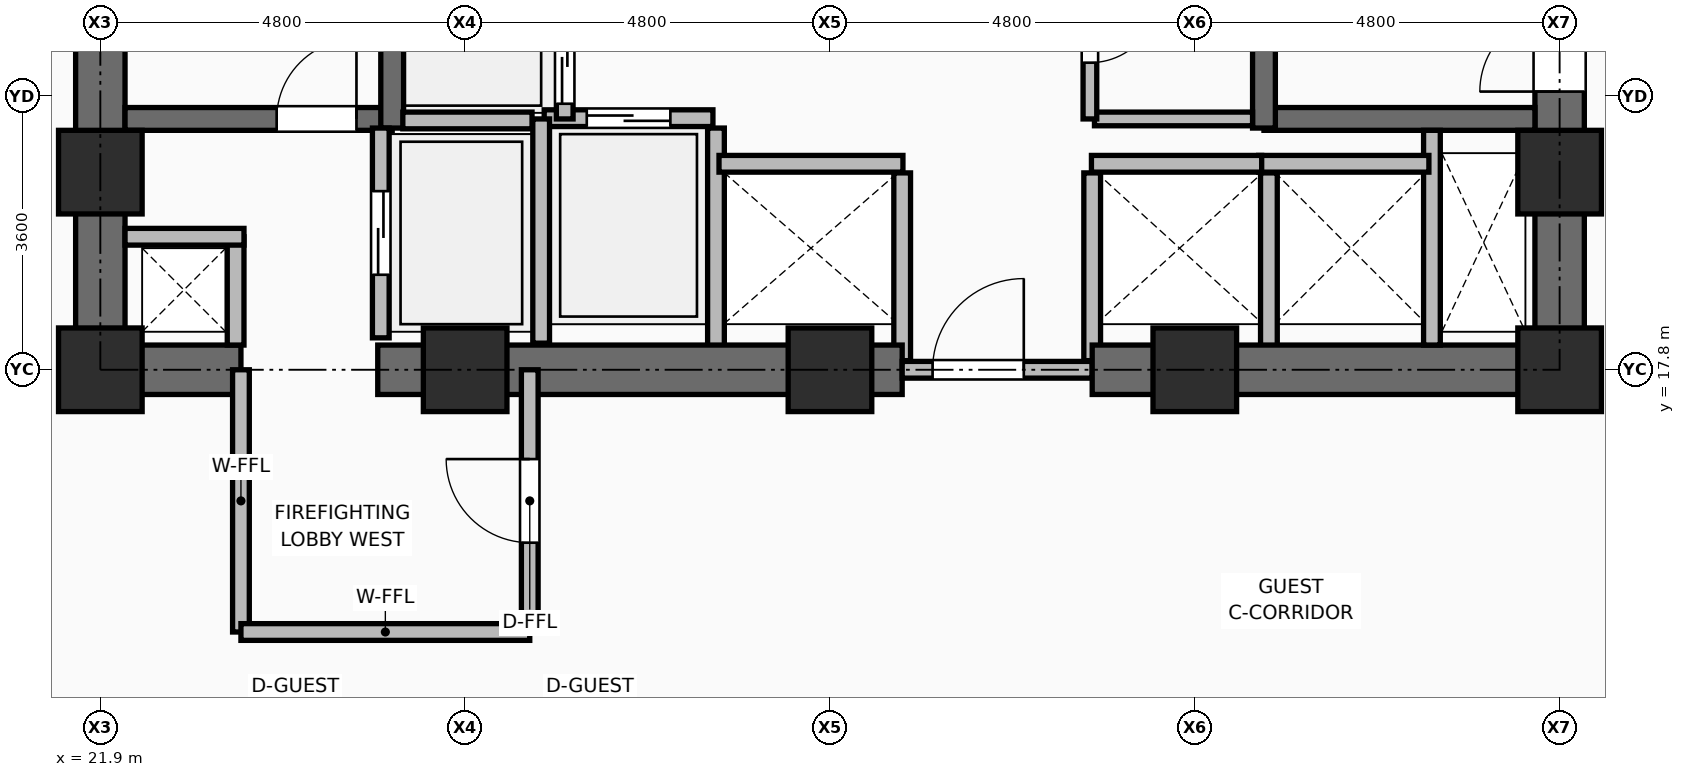
"""IFC4 building model, lengths in metres.
Left out: names, types, materials, properties, quantities, classifications, styles, units other than length and angle.
Written with IfcOpenShell. Run it as: python <this file> out.ifc"""

import sys

from ifc_helpers import new_model, si_unit, direction, frame, frame_2d, origin, origin_2d, place, context, subcontext, project, spatial, rectangle, extrude, element, fill, save


model = new_model("IFC4")
c1 = context("Model", 3, precision=1e-05, world=origin(), true_north=direction((0.0, 1.0)))
c2 = subcontext(c1, "Body", "Model", "MODEL_VIEW")
j1 = project(units=[si_unit("LENGTHUNIT", "METRE"), si_unit("PLANEANGLEUNIT", "RADIAN")], contexts=[c1])
p1 = place(None, origin())
s1 = spatial("IfcSite", under=j1, at=p1, CompositionType="ELEMENT")
p2 = place(p1, origin())
s2 = spatial("IfcBuilding", under=s1, at=p2, CompositionType="ELEMENT")
p3 = place(p2, frame((0.0, 0.0, 79.5)))
s3 = spatial("IfcBuildingStorey", under=s2, at=p3, CompositionType="ELEMENT", Elevation=79.5)
for number, where, z_axis, x_axis in (
    (1, (21.9, 17.8, 0.0), (0.0, 0.0, 1.0), (1.0, 0.0, 0.0)),
    (2, (26.7, 17.8, 0.0), (0.0, 0.0, 1.0), (1.0, 0.0, 0.0)),
    (3, (31.5, 17.8, 0.0), (0.0, 0.0, 1.0), (1.0, 0.0, 0.0)),
    (4, (36.3, 17.8, 0.0), (0.0, 0.0, 1.0), (1.0, 0.0, 0.0)),
    (5, (41.1, 17.8, 0.0), (0.0, 0.0, 1.0), (1.0, 0.0, 0.0)),
    (6, (21.9, 20.4, 0.0), (0.0, 0.0, 1.0), (1.0, 0.0, 0.0)),
    (7, (41.1, 20.4, 0.0), (0.0, 0.0, 1.0), (1.0, 0.0, 0.0)),
):
    element("IfcColumn", number, at=place(p3, frame(where, z_axis=z_axis, x_axis=x_axis)), inside=s3, PredefinedType="COLUMN", context=c2, shape_type="SweptSolid", body=[
        extrude(rectangle(XDim=1.1, YDim=1.1, at=origin_2d()), origin(), (0.0, 0.0, 1.0), 3.75),
    ])
p4 = place(p3, frame((30.0, 18.08, 0.0), z_axis=(0.0, 0.0, 1.0), x_axis=(0.0, 1.0, 0.0)))
e8 = element("IfcWall", 8, at=p4, inside=s3, PredefinedType="PARTITIONING", context=c2, shape_type="SweptSolid", body=[
    extrude(rectangle(XDim=2.9, YDim=0.22, at=frame_2d((1.45, 0.0))), origin(), (0.0, 0.0, 1.0), 3.545),
])
for number, where, z_axis, x_axis in (
    (9, (32.45, 17.92, 0.0), (0.0, 0.0, 1.0), (0.0, 1.0, 0.0)),
    (10, (34.95, 17.92, 0.0), (0.0, 0.0, 1.0), (0.0, 1.0, 0.0)),
):
    element("IfcWall", number, at=place(p3, frame(where, z_axis=z_axis, x_axis=x_axis)), inside=s3, PredefinedType="PARTITIONING", context=c2, shape_type="SweptSolid", body=[
        extrude(rectangle(XDim=2.47, YDim=0.22, at=frame_2d((1.235, 0.0))), origin(), (0.0, 0.0, 1.0), 2.928),
    ])
p5 = place(p3, frame((37.275, 18.08, 0.0), z_axis=(0.0, 0.0, 1.0), x_axis=(0.0, 1.0, 0.0)))
e11 = element("IfcWall", 11, at=p5, inside=s3, PredefinedType="PARTITIONING", context=c2, shape_type="SweptSolid", body=[
    extrude(rectangle(XDim=2.31, YDim=0.22, at=frame_2d((1.155, 0.0))), origin(), (0.0, 0.0, 1.0), 3.545),
])
p6 = place(p3, frame((21.575, 17.8, 0.0), z_axis=(0.0, 0.0, 1.0), x_axis=(1.0, 0.0, 0.0)))
e12 = element("IfcWall", 12, at=p6, inside=s3, PredefinedType="SHEAR", context=c2, shape_type="SweptSolid", body=[
    extrude(rectangle(XDim=2.175, YDim=0.65, at=frame_2d((1.087, 0.0))), origin(), (0.0, 0.0, 1.0), 3.57),
])
p7 = place(p3, frame((25.55, 17.8, 0.0), z_axis=(0.0, 0.0, 1.0), x_axis=(1.0, 0.0, 0.0)))
e13 = element("IfcWall", 13, at=p7, inside=s3, PredefinedType="SHEAR", context=c2, shape_type="SweptSolid", body=[
    extrude(rectangle(XDim=6.9, YDim=0.65, at=frame_2d((3.45, 0.0))), origin(), (0.0, 0.0, 1.0), 3.57),
])
p8 = place(p3, frame((32.45, 17.8, 0.0), z_axis=(0.0, 0.0, 1.0), x_axis=(1.0, 0.0, 0.0)))
e14 = element("IfcWall", 14, at=p8, inside=s3, PredefinedType="PARTITIONING", context=c2, shape_type="SweptSolid", body=[
    extrude(rectangle(XDim=2.5, YDim=0.22, at=frame_2d((1.25, 0.0))), origin(), (0.0, 0.0, 1.0), 2.928),
])
p9 = place(p8, frame((0.4, 0.0, 0.0)))
e15 = element("IfcOpeningElement", 15, at=p9, cuts=e14, PredefinedType="OPENING", context=c2, shape_type="SweptSolid", body=[
    extrude(rectangle(XDim=1.2, YDim=2.1, at=frame_2d((0.6, 1.05))), frame((0.0, 0.12, 0.0), z_axis=(0.0, -1.0, 0.0), x_axis=(1.0, 0.0, 0.0)), (0.0, 0.0, 1.0), 0.24),
])
p10 = place(p3, frame((34.95, 17.8, 0.0), z_axis=(0.0, 0.0, 1.0), x_axis=(1.0, 0.0, 0.0)))
e16 = element("IfcWall", 16, at=p10, inside=s3, PredefinedType="SHEAR", context=c2, shape_type="SweptSolid", body=[
    extrude(rectangle(XDim=6.475, YDim=0.65, at=frame_2d((3.238, 0.0))), origin(), (0.0, 0.0, 1.0), 3.57),
])
p11 = place(p3, frame((21.9, 18.125, 0.0), z_axis=(0.0, 0.0, 1.0), x_axis=(0.0, 1.0, 0.0)))
e17 = element("IfcWall", 17, at=p11, inside=s3, PredefinedType="SHEAR", context=c2, shape_type="SweptSolid", body=[
    extrude(rectangle(XDim=14.0, YDim=0.65, at=frame_2d((7.0, 0.0))), origin(), (0.0, 0.0, 1.0), 3.57),
])
p12 = place(p3, frame((41.1, 18.125, 0.0), z_axis=(0.0, 0.0, 1.0), x_axis=(0.0, 1.0, 0.0)))
e18 = element("IfcWall", 18, at=p12, inside=s3, PredefinedType="SHEAR", context=c2, shape_type="SweptSolid", body=[
    extrude(rectangle(XDim=14.0, YDim=0.65, at=frame_2d((7.0, 0.0))), origin(), (0.0, 0.0, 1.0), 3.57),
])
p13 = place(p12, frame((3.335, 0.0, 0.0)))
e19 = element("IfcOpeningElement", 19, at=p13, cuts=e18, PredefinedType="OPENING", context=c2, shape_type="SweptSolid", body=[
    extrude(rectangle(XDim=1.05, YDim=2.1, at=frame_2d((0.525, 1.05))), frame((0.0, 0.335, 0.0), z_axis=(0.0, -1.0, 0.0), x_axis=(1.0, 0.0, 0.0)), (0.0, 0.0, 1.0), 0.67),
])
p14 = place(p3, frame((22.225, 21.1, 0.0), z_axis=(0.0, 0.0, 1.0), x_axis=(1.0, 0.0, 0.0)))
e20 = element("IfcWall", 20, at=p14, inside=s3, PredefinedType="SHEAR", context=c2, shape_type="SweptSolid", body=[
    extrude(rectangle(XDim=3.515, YDim=0.3, at=frame_2d((1.757, 0.0))), origin(), (0.0, 0.0, 1.0), 3.57),
])
p15 = place(p14, frame((1.995, 0.0, 0.0)))
e21 = element("IfcOpeningElement", 21, at=p15, cuts=e20, PredefinedType="OPENING", context=c2, shape_type="SweptSolid", body=[
    extrude(rectangle(XDim=1.05, YDim=2.1, at=frame_2d((0.525, 1.05))), frame((0.0, 0.16, 0.0), z_axis=(0.0, -1.0, 0.0), x_axis=(1.0, 0.0, 0.0)), (0.0, 0.0, 1.0), 0.32),
])
p16 = place(p3, frame((25.74, 20.98, 0.0), z_axis=(0.0, 0.0, 1.0), x_axis=(0.0, 1.0, 0.0)))
e22 = element("IfcWall", 22, at=p16, inside=s3, PredefinedType="SHEAR", context=c2, shape_type="SweptSolid", body=[
    extrude(rectangle(XDim=7.99, YDim=0.3, at=frame_2d((3.995, 0.0))), origin(), (0.0, 0.0, 1.0), 3.57),
])
p17 = place(p3, frame((37.21, 21.1, 0.0), z_axis=(0.0, 0.0, 1.0), x_axis=(1.0, 0.0, 0.0)))
e23 = element("IfcWall", 23, at=p17, inside=s3, PredefinedType="SHEAR", context=c2, shape_type="SweptSolid", body=[
    extrude(rectangle(XDim=3.565, YDim=0.3, at=frame_2d((1.782, 0.0))), origin(), (0.0, 0.0, 1.0), 3.57),
])
p18 = place(p3, frame((37.21, 20.98, 0.0), z_axis=(0.0, 0.0, 1.0), x_axis=(0.0, 1.0, 0.0)))
e24 = element("IfcWall", 24, at=p18, inside=s3, PredefinedType="SHEAR", context=c2, shape_type="SweptSolid", body=[
    extrude(rectangle(XDim=7.99, YDim=0.3, at=frame_2d((3.995, 0.0))), origin(), (0.0, 0.0, 1.0), 3.57),
])
p19 = place(p3, frame((23.68, 18.125, 0.0), z_axis=(0.0, 0.0, 1.0), x_axis=(0.0, 1.0, 0.0)))
e25 = element("IfcWall", 25, at=p19, inside=s3, PredefinedType="PARTITIONING", context=c2, shape_type="SweptSolid", body=[
    extrude(rectangle(XDim=1.425, YDim=0.22, at=frame_2d((0.712, 0.0))), origin(), (0.0, 0.0, 1.0), 3.55),
])
p20 = place(p3, frame((22.225, 19.55, 0.0), z_axis=(0.0, 0.0, 1.0), x_axis=(1.0, 0.0, 0.0)))
e26 = element("IfcWall", 26, at=p20, inside=s3, PredefinedType="PARTITIONING", context=c2, shape_type="SweptSolid", body=[
    extrude(rectangle(XDim=1.565, YDim=0.22, at=frame_2d((0.782, 0.0))), origin(), (0.0, 0.0, 1.0), 2.595),
])
p21 = place(p3, frame((39.42, 18.125, 0.0), z_axis=(0.0, 0.0, 1.0), x_axis=(0.0, 1.0, 0.0)))
e27 = element("IfcWall", 27, at=p21, inside=s3, PredefinedType="PARTITIONING", context=c2, shape_type="SweptSolid", body=[
    extrude(rectangle(XDim=2.825, YDim=0.22, at=frame_2d((1.413, 0.0))), origin(), (0.0, 0.0, 1.0), 3.55),
])
p22 = place(p3, frame((25.59, 18.22, 0.0), z_axis=(0.0, 0.0, 1.0), x_axis=(0.0, 1.0, 0.0)))
e28 = element("IfcWall", 28, at=p22, inside=s3, PredefinedType="PARTITIONING", context=c2, shape_type="SweptSolid", body=[
    extrude(rectangle(XDim=2.76, YDim=0.22, at=frame_2d((1.38, 0.0))), origin(), (0.0, 0.0, 1.0), 3.55),
])
p23 = place(p22, frame((0.83, 0.0, 0.0)))
e29 = element("IfcOpeningElement", 29, at=p23, cuts=e28, PredefinedType="OPENING", context=c2, shape_type="SweptSolid", body=[
    extrude(rectangle(XDim=1.1, YDim=2.2, at=frame_2d((0.55, 1.1))), frame((0.0, 0.12, 0.0), z_axis=(0.0, -1.0, 0.0), x_axis=(1.0, 0.0, 0.0)), (0.0, 0.0, 1.0), 0.24),
])
p24 = place(p3, frame((27.74, 21.11, 0.0), z_axis=(0.0, 0.0, 1.0), x_axis=(1.0, 0.0, 0.0)))
e30 = element("IfcWall", 30, at=p24, inside=s3, PredefinedType="PARTITIONING", context=c2, shape_type="SweptSolid", body=[
    extrude(rectangle(XDim=2.22, YDim=0.22, at=frame_2d((1.11, 0.0))), origin(), (0.0, 0.0, 1.0), 3.55),
])
p25 = place(p24, frame((0.56, 0.0, 0.0)))
e31 = element("IfcOpeningElement", 31, at=p25, cuts=e30, PredefinedType="OPENING", context=c2, shape_type="SweptSolid", body=[
    extrude(rectangle(XDim=1.1, YDim=2.2, at=frame_2d((0.55, 1.1))), frame((0.0, 0.12, 0.0), z_axis=(0.0, -1.0, 0.0), x_axis=(1.0, 0.0, 0.0)), (0.0, 0.0, 1.0), 0.24),
])
p26 = place(p3, frame((30.04, 20.51, 0.0), z_axis=(0.0, 0.0, 1.0), x_axis=(1.0, 0.0, 0.0)))
e32 = element("IfcWall", 32, at=p26, inside=s3, PredefinedType="PARTITIONING", context=c2, shape_type="SweptSolid", body=[
    extrude(rectangle(XDim=2.42, YDim=0.22, at=frame_2d((1.21, 0.0))), origin(), (0.0, 0.0, 1.0), 3.55),
])
for number, where, z_axis, x_axis in (
    (33, (37.14, 20.51, 0.0), (0.0, 0.0, 1.0), (1.0, 0.0, 0.0)),
    (34, (34.94, 20.51, 0.0), (0.0, 0.0, 1.0), (1.0, 0.0, 0.0)),
):
    element("IfcWall", number, at=place(p3, frame(where, z_axis=z_axis, x_axis=x_axis)), inside=s3, PredefinedType="PARTITIONING", context=c2, shape_type="SweptSolid", body=[
        extrude(rectangle(XDim=2.24, YDim=0.22, at=frame_2d((1.12, 0.0))), origin(), (0.0, 0.0, 1.0), 3.55),
    ])
p27 = place(p3, frame((28.01, 21.1, 0.0), z_axis=(0.0, 0.0, 1.0), x_axis=(0.0, 1.0, 0.0)))
e35 = element("IfcWall", 35, at=p27, inside=s3, PredefinedType="PARTITIONING", context=c2, shape_type="SweptSolid", body=[
    extrude(rectangle(XDim=1.5, YDim=0.22, at=frame_2d((0.75, 0.0))), origin(), (0.0, 0.0, 1.0), 3.55),
])
p28 = place(p27, frame((0.2, 0.0, 0.0)))
e36 = element("IfcOpeningElement", 36, at=p28, cuts=e35, PredefinedType="OPENING", context=c2, shape_type="SweptSolid", body=[
    extrude(rectangle(XDim=1.1, YDim=2.2, at=frame_2d((0.55, 1.1))), frame((0.0, 0.12, 0.0), z_axis=(0.0, -1.0, 0.0), x_axis=(1.0, 0.0, 0.0)), (0.0, 0.0, 1.0), 0.24),
])
p29 = place(p3, frame((27.7, 18.15, 0.0), z_axis=(0.0, 0.0, 1.0), x_axis=(0.0, 1.0, 0.0)))
e37 = element("IfcWall", 37, at=p29, inside=s3, PredefinedType="PARTITIONING", context=c2, shape_type="SweptSolid", body=[
    extrude(rectangle(XDim=2.95, YDim=0.22, at=frame_2d((1.475, 0.0))), origin(), (0.0, 0.0, 1.0), 3.55),
])
p30 = place(p3, frame((25.88, 21.08, 0.0), z_axis=(0.0, 0.0, 1.0), x_axis=(1.0, 0.0, 0.0)))
e38 = element("IfcWall", 38, at=p30, inside=s3, PredefinedType="PARTITIONING", context=c2, shape_type="SweptSolid", body=[
    extrude(rectangle(XDim=1.7, YDim=0.22, at=frame_2d((0.85, 0.0))), origin(), (0.0, 0.0, 1.0), 3.55),
])
p31 = place(p3, frame((34.98, 21.1, 0.0), z_axis=(0.0, 0.0, 1.0), x_axis=(1.0, 0.0, 0.0)))
e39 = element("IfcWall", 39, at=p31, inside=s3, PredefinedType="PARTITIONING", context=c2, shape_type="SweptSolid", body=[
    extrude(rectangle(XDim=2.08, YDim=0.18, at=frame_2d((1.04, 0.0))), origin(), (0.0, 0.0, 1.0), 3.55),
])
p32 = place(p3, frame((34.92, 21.1, 0.0), z_axis=(0.0, 0.0, 1.0), x_axis=(0.0, 1.0, 0.0)))
e40 = element("IfcWall", 40, at=p32, inside=s3, PredefinedType="PARTITIONING", context=c2, shape_type="SweptSolid", body=[
    extrude(rectangle(XDim=2.38, YDim=0.18, at=frame_2d((1.19, 0.0))), origin(), (0.0, 0.0, 1.0), 3.55),
])
p33 = place(p32, frame((0.74, 0.0, 0.0)))
e41 = element("IfcOpeningElement", 41, at=p33, cuts=e40, PredefinedType="OPENING", context=c2, shape_type="SweptSolid", body=[
    extrude(rectangle(XDim=0.9, YDim=2.1, at=frame_2d((0.45, 1.05))), frame((0.0, 0.1, 0.0), z_axis=(0.0, -1.0, 0.0), x_axis=(1.0, 0.0, 0.0)), (0.0, 0.0, 1.0), 0.2),
])
p34 = place(p3, frame((23.75, 14.35, 0.0), z_axis=(0.0, 0.0, 1.0), x_axis=(0.0, 1.0, 0.0)))
e42 = element("IfcWall", 42, at=p34, inside=s3, PredefinedType="PARTITIONING", context=c2, shape_type="SweptSolid", body=[
    extrude(rectangle(XDim=3.45, YDim=0.22, at=frame_2d((1.725, 0.0))), origin(), (0.0, 0.0, 1.0), 2.928),
])
p35 = place(p3, frame((23.75, 14.35, 0.0), z_axis=(0.0, 0.0, 1.0), x_axis=(1.0, 0.0, 0.0)))
e43 = element("IfcWall", 43, at=p35, inside=s3, PredefinedType="PARTITIONING", context=c2, shape_type="SweptSolid", body=[
    extrude(rectangle(XDim=3.8, YDim=0.22, at=frame_2d((1.9, 0.0))), origin(), (0.0, 0.0, 1.0), 3.55),
])
p36 = place(p3, frame((27.55, 14.35, 0.0), z_axis=(0.0, 0.0, 1.0), x_axis=(0.0, 1.0, 0.0)))
e44 = element("IfcWall", 44, at=p36, inside=s3, PredefinedType="PARTITIONING", context=c2, shape_type="SweptSolid", body=[
    extrude(rectangle(XDim=3.45, YDim=0.22, at=frame_2d((1.725, 0.0))), origin(), (0.0, 0.0, 1.0), 2.928),
])
p37 = place(p36, frame((1.175, 0.0, 0.0)))
e45 = element("IfcOpeningElement", 45, at=p37, cuts=e44, PredefinedType="OPENING", context=c2, shape_type="SweptSolid", body=[
    extrude(rectangle(XDim=1.1, YDim=2.1, at=frame_2d((0.55, 1.05))), frame((0.0, 0.12, 0.0), z_axis=(0.0, -1.0, 0.0), x_axis=(1.0, 0.0, 0.0)), (0.0, 0.0, 1.0), 0.24),
])
p38 = place(p9, origin())
e46 = element("IfcDoor", 46, at=p38, inside=s3, OperationType="SINGLE_SWING_RIGHT", PredefinedType="DOOR", context=c2, shape_type="SweptSolid", body=[
    extrude(rectangle(XDim=1.2, YDim=2.1, at=frame_2d((0.6, 1.05))), frame((0.0, 0.025, 0.0), z_axis=(0.0, -1.0, 0.0), x_axis=(1.0, 0.0, 0.0)), (0.0, 0.0, 1.0), 0.05),
])
fill(e15, e46)
p39 = place(p15, origin())
e47 = element("IfcDoor", 47, at=p39, inside=s3, OperationType="SINGLE_SWING_RIGHT", PredefinedType="DOOR", context=c2, shape_type="SweptSolid", body=[
    extrude(rectangle(XDim=1.05, YDim=2.1, at=frame_2d((0.525, 1.05))), frame((0.0, 0.025, 0.0), z_axis=(0.0, -1.0, 0.0), x_axis=(1.0, 0.0, 0.0)), (0.0, 0.0, 1.0), 0.05),
])
fill(e21, e47)
p40 = place(p13, origin())
e48 = element("IfcDoor", 48, at=p40, inside=s3, OperationType="SINGLE_SWING_LEFT", PredefinedType="DOOR", context=c2, shape_type="SweptSolid", body=[
    extrude(rectangle(XDim=1.05, YDim=2.1, at=frame_2d((0.525, 1.05))), frame((0.0, 0.025, 0.0), z_axis=(0.0, -1.0, 0.0), x_axis=(1.0, 0.0, 0.0)), (0.0, 0.0, 1.0), 0.05),
])
fill(e19, e48)
p41 = place(p23, origin())
e49 = element("IfcDoor", 49, at=p41, inside=s3, OperationType="DOUBLE_DOOR_SLIDING", PredefinedType="DOOR", context=c2, shape_type="SweptSolid", body=[
    extrude(rectangle(XDim=1.1, YDim=2.2, at=frame_2d((0.55, 1.1))), frame((0.0, 0.025, 0.0), z_axis=(0.0, -1.0, 0.0), x_axis=(1.0, 0.0, 0.0)), (0.0, 0.0, 1.0), 0.05),
])
fill(e29, e49)
p42 = place(p25, origin())
e50 = element("IfcDoor", 50, at=p42, inside=s3, OperationType="DOUBLE_DOOR_SLIDING", PredefinedType="DOOR", context=c2, shape_type="SweptSolid", body=[
    extrude(rectangle(XDim=1.1, YDim=2.2, at=frame_2d((0.55, 1.1))), frame((0.0, 0.025, 0.0), z_axis=(0.0, -1.0, 0.0), x_axis=(1.0, 0.0, 0.0)), (0.0, 0.0, 1.0), 0.05),
])
fill(e31, e50)
p43 = place(p28, frame((1.1, 0.0, 0.0), z_axis=(0.0, 0.0, 1.0), x_axis=(-1.0, 0.0, 0.0)))
e51 = element("IfcDoor", 51, at=p43, inside=s3, OperationType="DOUBLE_DOOR_SLIDING", PredefinedType="DOOR", context=c2, shape_type="SweptSolid", body=[
    extrude(rectangle(XDim=1.1, YDim=2.2, at=frame_2d((0.55, 1.1))), frame((0.0, 0.025, 0.0), z_axis=(0.0, -1.0, 0.0), x_axis=(1.0, 0.0, 0.0)), (0.0, 0.0, 1.0), 0.05),
])
fill(e36, e51)
p44 = place(p33, frame((0.9, 0.0, 0.0), z_axis=(0.0, 0.0, 1.0), x_axis=(-1.0, 0.0, 0.0)))
e52 = element("IfcDoor", 52, at=p44, inside=s3, OperationType="SINGLE_SWING_LEFT", PredefinedType="DOOR", context=c2, shape_type="SweptSolid", body=[
    extrude(rectangle(XDim=0.9, YDim=2.1, at=frame_2d((0.45, 1.05))), frame((0.0, 0.025, 0.0), z_axis=(0.0, -1.0, 0.0), x_axis=(1.0, 0.0, 0.0)), (0.0, 0.0, 1.0), 0.05),
])
fill(e41, e52)
p45 = place(p37, origin())
e53 = element("IfcDoor", 53, at=p45, inside=s3, OperationType="SINGLE_SWING_RIGHT", PredefinedType="DOOR", context=c2, shape_type="SweptSolid", body=[
    extrude(rectangle(XDim=1.1, YDim=2.1, at=frame_2d((0.55, 1.05))), frame((0.0, 0.025, 0.0), z_axis=(0.0, -1.0, 0.0), x_axis=(1.0, 0.0, 0.0)), (0.0, 0.0, 1.0), 0.05),
])
fill(e45, e53)
save(model, sys.argv[1])
